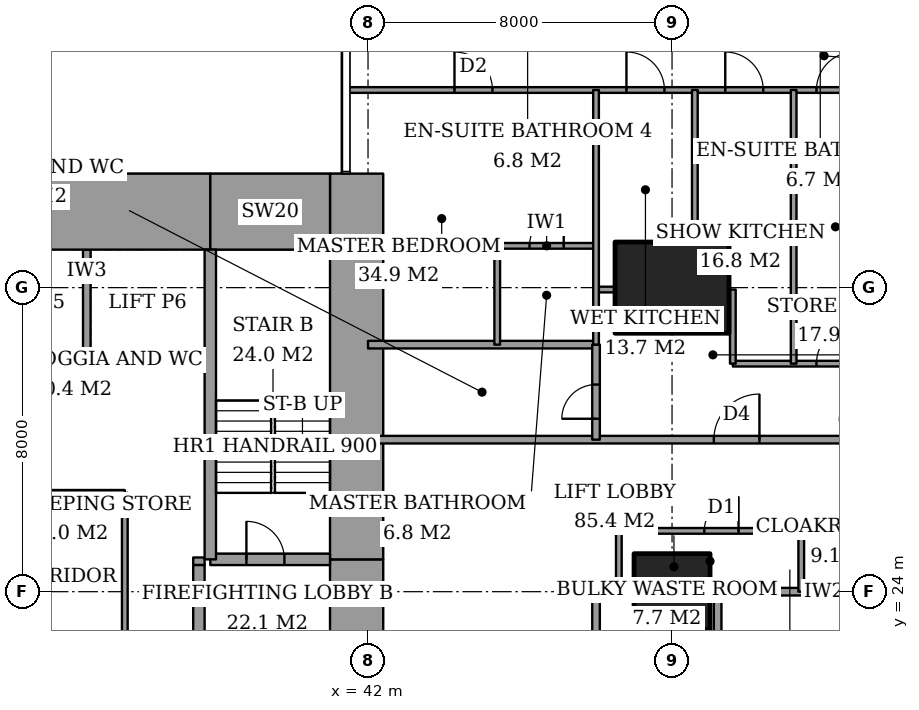
"""IFC4 building model, lengths in metres.
Left out: names, types, materials, properties, quantities, classifications, styles, units other than length and angle.
Written with IfcOpenShell. Run it as: python <this file> out.ifc"""

import sys

from ifc_helpers import new_model, si_unit, direction, frame, frame_2d, origin, origin_2d, place, context, subcontext, project, spatial, rectangle, extrude, element, fill, save


model = new_model("IFC4")
c1 = context("Model", 3, precision=1e-05, world=origin(), true_north=direction((0.0, 1.0)))
c2 = subcontext(c1, "Body", "Model", "MODEL_VIEW")
j1 = project(units=[si_unit("LENGTHUNIT", "METRE"), si_unit("PLANEANGLEUNIT", "RADIAN")], contexts=[c1])
p1 = place(None, origin())
s1 = spatial("IfcSite", under=j1, at=p1, CompositionType="ELEMENT")
p2 = place(p1, origin())
s2 = spatial("IfcBuilding", under=s1, at=p2, CompositionType="ELEMENT")
p3 = place(p2, frame((0.0, 0.0, 62.0)))
s3 = spatial("IfcBuildingStorey", under=s2, at=p3, CompositionType="ELEMENT", Elevation=62.0)
p4 = place(p3, frame((50.0, 24.0, 0.0), z_axis=(0.0, 0.0, 1.0), x_axis=(1.0, 0.0, 0.0)))
e1 = element("IfcColumn", 1, at=p4, inside=s3, PredefinedType="COLUMN", context=c2, shape_type="SweptSolid", body=[
    extrude(rectangle(XDim=2.0, YDim=2.0, at=origin_2d()), origin(), (0.0, 0.0, 1.0), 3.6),
])
p5 = place(p3, frame((50.0, 32.0, 0.0), z_axis=(0.0, 0.0, 1.0), x_axis=(1.0, 0.0, 0.0)))
e2 = element("IfcColumn", 2, at=p5, inside=s3, PredefinedType="COLUMN", context=c2, shape_type="SweptSolid", body=[
    extrude(rectangle(XDim=3.0, YDim=2.4, at=origin_2d()), origin(), (0.0, 0.0, 1.0), 3.6),
])
p6 = place(p3, frame((28.15, 34.0, 0.0), z_axis=(0.0, 0.0, 1.0), x_axis=(1.0, 0.0, 0.0)))
e3 = element("IfcWall", 3, at=p6, inside=s3, PredefinedType="SHEAR", context=c2, shape_type="SweptSolid", body=[
    extrude(rectangle(XDim=9.7, YDim=2.0, at=frame_2d((4.85, 0.0))), origin(), (0.0, 0.0, 1.0), 3.6),
])
p7 = place(p3, frame((37.85, 34.0, 0.0), z_axis=(0.0, 0.0, 1.0), x_axis=(1.0, 0.0, 0.0)))
e4 = element("IfcWall", 4, at=p7, inside=s3, PredefinedType="SHEAR", context=c2, shape_type="SweptSolid", body=[
    extrude(rectangle(XDim=3.15, YDim=2.0, at=frame_2d((1.575, 0.0))), origin(), (0.0, 0.0, 1.0), 3.6),
])
p8 = place(p3, frame((41.7, 13.0, 0.0), z_axis=(0.0, 0.0, 1.0), x_axis=(0.0, 1.0, 0.0)))
e5 = element("IfcWall", 5, at=p8, inside=s3, PredefinedType="SHEAR", context=c2, shape_type="SweptSolid", body=[
    extrude(rectangle(XDim=11.85, YDim=1.4, at=frame_2d((5.925, 0.0))), origin(), (0.0, 0.0, 1.0), 3.6),
])
p9 = place(p8, frame((7.5, 0.0, 0.0)))
e6 = element("IfcOpeningElement", 6, at=p9, cuts=e5, PredefinedType="OPENING", context=c2, shape_type="SweptSolid", body=[
    extrude(rectangle(XDim=1.8, YDim=2.4, at=frame_2d((0.9, 1.2))), frame((0.0, 0.71, 0.0), z_axis=(0.0, -1.0, 0.0), x_axis=(1.0, 0.0, 0.0)), (0.0, 0.0, 1.0), 1.42),
])
p10 = place(p3, frame((41.7, 24.85, 0.0), z_axis=(0.0, 0.0, 1.0), x_axis=(0.0, 1.0, 0.0)))
e7 = element("IfcWall", 7, at=p10, inside=s3, PredefinedType="SHEAR", context=c2, shape_type="SweptSolid", body=[
    extrude(rectangle(XDim=10.15, YDim=1.4, at=frame_2d((5.075, 0.0))), origin(), (0.0, 0.0, 1.0), 3.6),
])
p11 = place(p3, frame((37.85, 24.85, 0.0), z_axis=(0.0, 0.0, 1.0), x_axis=(0.0, 1.0, 0.0)))
e8 = element("IfcWall", 8, at=p11, inside=s3, PredefinedType="SHEAR", context=c2, shape_type="SweptSolid", body=[
    extrude(rectangle(XDim=8.15, YDim=0.3, at=frame_2d((4.075, 0.0))), origin(), (0.0, 0.0, 1.0), 3.6),
])
p12 = place(p3, frame((37.85, 24.85, 0.0), z_axis=(0.0, 0.0, 1.0), x_axis=(1.0, 0.0, 0.0)))
e9 = element("IfcWall", 9, at=p12, inside=s3, PredefinedType="SHEAR", context=c2, shape_type="SweptSolid", body=[
    extrude(rectangle(XDim=3.15, YDim=0.3, at=frame_2d((1.575, 0.0))), origin(), (0.0, 0.0, 1.0), 3.6),
])
p13 = place(p12, frame((0.95, 0.0, 0.0)))
e10 = element("IfcOpeningElement", 10, at=p13, cuts=e9, PredefinedType="OPENING", context=c2, shape_type="SweptSolid", body=[
    extrude(rectangle(XDim=1.0, YDim=2.1, at=frame_2d((0.5, 1.05))), frame((0.0, 0.16, 0.0), z_axis=(0.0, -1.0, 0.0), x_axis=(1.0, 0.0, 0.0)), (0.0, 0.0, 1.0), 0.32),
])
p14 = place(p3, frame((37.55, 18.0, 0.0), z_axis=(0.0, 0.0, 1.0), x_axis=(0.0, 1.0, 0.0)))
e11 = element("IfcWall", 11, at=p14, inside=s3, PredefinedType="PARTITIONING", context=c2, shape_type="SweptSolid", body=[
    extrude(rectangle(XDim=6.7, YDim=0.3, at=frame_2d((3.35, 0.0))), origin(), (0.0, 0.0, 1.0), 3.6),
])
p15 = place(p14, frame((2.8, 0.0, 0.0)))
e12 = element("IfcOpeningElement", 12, at=p15, cuts=e11, PredefinedType="OPENING", context=c2, shape_type="SweptSolid", body=[
    extrude(rectangle(XDim=1.2, YDim=2.1, at=frame_2d((0.6, 1.05))), frame((0.0, 0.16, 0.0), z_axis=(0.0, -1.0, 0.0), x_axis=(1.0, 0.0, 0.0)), (0.0, 0.0, 1.0), 0.32),
])
p16 = place(p3, frame((48.0, 24.0, 0.0), z_axis=(0.0, 0.0, 1.0), x_axis=(1.0, 0.0, 0.0)))
e13 = element("IfcWall", 13, at=p16, inside=s3, PredefinedType="PARTITIONING", context=c2, shape_type="SweptSolid", body=[
    extrude(rectangle(XDim=1.0, YDim=0.2, at=frame_2d((0.5, 0.0))), origin(), (0.0, 0.0, 1.0), 3.35),
])
p17 = place(p3, frame((51.0, 24.0, 0.0), z_axis=(0.0, 0.0, 1.0), x_axis=(1.0, 0.0, 0.0)))
e14 = element("IfcWall", 14, at=p17, inside=s3, PredefinedType="PARTITIONING", context=c2, shape_type="SweptSolid", body=[
    extrude(rectangle(XDim=6.0, YDim=0.2, at=frame_2d((3.0, 0.0))), origin(), (0.0, 0.0, 1.0), 3.35),
])
p18 = place(p3, frame((48.6, 25.6, 0.0), z_axis=(0.0, 0.0, 1.0), x_axis=(1.0, 0.0, 0.0)))
e15 = element("IfcWall", 15, at=p18, inside=s3, PredefinedType="PARTITIONING", context=c2, shape_type="SweptSolid", body=[
    extrude(rectangle(XDim=4.8, YDim=0.15, at=frame_2d((2.4, 0.0))), origin(), (0.0, 0.0, 1.0), 3.35),
])
p19 = place(p18, frame((2.25, 0.0, 0.0)))
e16 = element("IfcOpeningElement", 16, at=p19, cuts=e15, PredefinedType="OPENING", context=c2, shape_type="SweptSolid", body=[
    extrude(rectangle(XDim=0.9, YDim=2.1, at=frame_2d((0.45, 1.05))), frame((0.0, 0.085, 0.0), z_axis=(0.0, -1.0, 0.0), x_axis=(1.0, 0.0, 0.0)), (0.0, 0.0, 1.0), 0.17),
])
p20 = place(p3, frame((42.0, 28.0, 0.0), z_axis=(0.0, 0.0, 1.0), x_axis=(1.0, 0.0, 0.0)))
e17 = element("IfcWall", 17, at=p20, inside=s3, PredefinedType="PARTITIONING", context=c2, shape_type="SweptSolid", body=[
    extrude(rectangle(XDim=17.275, YDim=0.2, at=frame_2d((8.637, 0.0))), origin(), (0.0, 0.0, 1.0), 3.35),
])
p21 = place(p20, frame((9.1, 0.0, 0.0)))
e18 = element("IfcOpeningElement", 18, at=p21, cuts=e17, PredefinedType="OPENING", context=c2, shape_type="SweptSolid", body=[
    extrude(rectangle(XDim=1.2, YDim=2.4, at=frame_2d((0.6, 1.2))), frame((0.0, 0.11, 0.0), z_axis=(0.0, -1.0, 0.0), x_axis=(1.0, 0.0, 0.0)), (0.0, 0.0, 1.0), 0.22),
])
p22 = place(p3, frame((51.6, 30.0, 0.0), z_axis=(0.0, 0.0, 1.0), x_axis=(1.0, 0.0, 0.0)))
e19 = element("IfcWall", 19, at=p22, inside=s3, PredefinedType="PARTITIONING", context=c2, shape_type="SweptSolid", body=[
    extrude(rectangle(XDim=3.8, YDim=0.15, at=frame_2d((1.9, 0.0))), origin(), (0.0, 0.0, 1.0), 3.35),
])
p23 = place(p22, frame((2.2, 0.0, 0.0)))
e20 = element("IfcOpeningElement", 20, at=p23, cuts=e19, PredefinedType="OPENING", context=c2, shape_type="SweptSolid", body=[
    extrude(rectangle(XDim=1.0, YDim=2.1, at=frame_2d((0.5, 1.05))), frame((0.0, 0.085, 0.0), z_axis=(0.0, -1.0, 0.0), x_axis=(1.0, 0.0, 0.0)), (0.0, 0.0, 1.0), 0.17),
])
p24 = place(p3, frame((42.0, 30.5, 0.0), z_axis=(0.0, 0.0, 1.0), x_axis=(1.0, 0.0, 0.0)))
e21 = element("IfcWall", 21, at=p24, inside=s3, PredefinedType="PARTITIONING", context=c2, shape_type="SweptSolid", body=[
    extrude(rectangle(XDim=6.0, YDim=0.2, at=frame_2d((3.0, 0.0))), origin(), (0.0, 0.0, 1.0), 3.35),
])
p25 = place(p3, frame((48.0, 31.95, 0.0), z_axis=(0.0, 0.0, 1.0), x_axis=(1.0, 0.0, 0.0)))
e22 = element("IfcWall", 22, at=p25, inside=s3, PredefinedType="PARTITIONING", context=c2, shape_type="SweptSolid", body=[
    extrude(rectangle(XDim=0.5, YDim=0.15, at=frame_2d((0.25, 0.0))), origin(), (0.0, 0.0, 1.0), 2.634),
])
p26 = place(p3, frame((45.4, 33.1, 0.0), z_axis=(0.0, 0.0, 1.0), x_axis=(1.0, 0.0, 0.0)))
e23 = element("IfcWall", 23, at=p26, inside=s3, PredefinedType="PARTITIONING", context=c2, shape_type="SweptSolid", body=[
    extrude(rectangle(XDim=2.6, YDim=0.15, at=frame_2d((1.3, 0.0))), origin(), (0.0, 0.0, 1.0), 3.35),
])
p27 = place(p26, frame((0.85, 0.0, 0.0)))
e24 = element("IfcOpeningElement", 24, at=p27, cuts=e23, PredefinedType="OPENING", context=c2, shape_type="SweptSolid", body=[
    extrude(rectangle(XDim=0.9, YDim=2.1, at=frame_2d((0.45, 1.05))), frame((0.0, 0.085, 0.0), z_axis=(0.0, -1.0, 0.0), x_axis=(1.0, 0.0, 0.0)), (0.0, 0.0, 1.0), 0.17),
])
p28 = place(p3, frame((41.439, 37.2, 0.0), z_axis=(0.0, 0.0, 1.0), x_axis=(1.0, 0.0, 0.0)))
e25 = element("IfcWall", 25, at=p28, inside=s3, PredefinedType="PARTITIONING", context=c2, shape_type="SweptSolid", body=[
    extrude(rectangle(XDim=25.011, YDim=0.15, at=frame_2d((12.505, 0.0))), origin(), (0.0, 0.0, 1.0), 3.35),
])
p29 = place(p28, frame((12.361, 0.0, 0.0)))
e26 = element("IfcOpeningElement", 26, at=p29, cuts=e25, PredefinedType="OPENING", context=c2, shape_type="SweptSolid", body=[
    extrude(rectangle(XDim=1.0, YDim=2.1, at=frame_2d((0.5, 1.05))), frame((0.0, 0.085, 0.0), z_axis=(0.0, -1.0, 0.0), x_axis=(1.0, 0.0, 0.0)), (0.0, 0.0, 1.0), 0.17),
])
p30 = place(p28, frame((20.924, 0.0, 0.0)))
e27 = element("IfcOpeningElement", 27, at=p30, cuts=e25, PredefinedType="OPENING", context=c2, shape_type="SweptSolid", body=[
    extrude(rectangle(XDim=1.0, YDim=2.1, at=frame_2d((0.5, 1.05))), frame((0.0, 0.085, 0.0), z_axis=(0.0, -1.0, 0.0), x_axis=(1.0, 0.0, 0.0)), (0.0, 0.0, 1.0), 0.17),
])
p31 = place(p28, frame((15.448, 0.0, 0.0)))
e28 = element("IfcOpeningElement", 28, at=p31, cuts=e25, PredefinedType="OPENING", context=c2, shape_type="SweptSolid", body=[
    extrude(rectangle(XDim=0.9, YDim=2.1, at=frame_2d((0.45, 1.05))), frame((0.0, 0.085, 0.0), z_axis=(0.0, -1.0, 0.0), x_axis=(1.0, 0.0, 0.0)), (0.0, 0.0, 1.0), 0.17),
])
p32 = place(p28, frame((9.961, 0.0, 0.0)))
e29 = element("IfcOpeningElement", 29, at=p32, cuts=e25, PredefinedType="OPENING", context=c2, shape_type="SweptSolid", body=[
    extrude(rectangle(XDim=1.0, YDim=2.1, at=frame_2d((0.5, 1.05))), frame((0.0, 0.085, 0.0), z_axis=(0.0, -1.0, 0.0), x_axis=(1.0, 0.0, 0.0)), (0.0, 0.0, 1.0), 0.17),
])
p33 = place(p28, frame((7.361, 0.0, 0.0)))
e30 = element("IfcOpeningElement", 30, at=p33, cuts=e25, PredefinedType="OPENING", context=c2, shape_type="SweptSolid", body=[
    extrude(rectangle(XDim=1.0, YDim=2.1, at=frame_2d((0.5, 1.05))), frame((0.0, 0.085, 0.0), z_axis=(0.0, -1.0, 0.0), x_axis=(1.0, 0.0, 0.0)), (0.0, 0.0, 1.0), 0.17),
])
p34 = place(p28, frame((2.836, 0.0, 0.0)))
e31 = element("IfcOpeningElement", 31, at=p34, cuts=e25, PredefinedType="OPENING", context=c2, shape_type="SweptSolid", body=[
    extrude(rectangle(XDim=1.0, YDim=2.1, at=frame_2d((0.5, 1.05))), frame((0.0, 0.085, 0.0), z_axis=(0.0, -1.0, 0.0), x_axis=(1.0, 0.0, 0.0)), (0.0, 0.0, 1.0), 0.17),
])
p35 = place(p3, frame((45.4, 30.5, 0.0), z_axis=(0.0, 0.0, 1.0), x_axis=(0.0, 1.0, 0.0)))
e32 = element("IfcWall", 32, at=p35, inside=s3, PredefinedType="PARTITIONING", context=c2, shape_type="SweptSolid", body=[
    extrude(rectangle(XDim=2.6, YDim=0.15, at=frame_2d((1.3, 0.0))), origin(), (0.0, 0.0, 1.0), 3.35),
])
p36 = place(p3, frame((48.0, 17.0, 0.0), z_axis=(0.0, 0.0, 1.0), x_axis=(0.0, 1.0, 0.0)))
e33 = element("IfcWall", 33, at=p36, inside=s3, PredefinedType="PARTITIONING", context=c2, shape_type="SweptSolid", body=[
    extrude(rectangle(XDim=7.0, YDim=0.2, at=frame_2d((3.5, 0.0))), origin(), (0.0, 0.0, 1.0), 3.35),
])
p37 = place(p36, frame((4.4, 0.0, 0.0)))
e34 = element("IfcOpeningElement", 34, at=p37, cuts=e33, PredefinedType="OPENING", context=c2, shape_type="SweptSolid", body=[
    extrude(rectangle(XDim=1.2, YDim=2.4, at=frame_2d((0.6, 1.2))), frame((0.0, 0.11, 0.0), z_axis=(0.0, -1.0, 0.0), x_axis=(1.0, 0.0, 0.0)), (0.0, 0.0, 1.0), 0.22),
])
p38 = place(p36, frame((1.0, 0.0, 0.0)))
e35 = element("IfcOpeningElement", 35, at=p38, cuts=e33, PredefinedType="OPENING", context=c2, shape_type="SweptSolid", body=[
    extrude(rectangle(XDim=1.0, YDim=2.1, at=frame_2d((0.5, 1.05))), frame((0.0, 0.11, 0.0), z_axis=(0.0, -1.0, 0.0), x_axis=(1.0, 0.0, 0.0)), (0.0, 0.0, 1.0), 0.22),
])
p39 = place(p3, frame((48.0, 28.0, 0.0), z_axis=(0.0, 0.0, 1.0), x_axis=(0.0, 1.0, 0.0)))
e36 = element("IfcWall", 36, at=p39, inside=s3, PredefinedType="PARTITIONING", context=c2, shape_type="SweptSolid", body=[
    extrude(rectangle(XDim=2.5, YDim=0.2, at=frame_2d((1.25, 0.0))), origin(), (0.0, 0.0, 1.0), 3.35),
])
p40 = place(p39, frame((0.55, 0.0, 0.0)))
e37 = element("IfcOpeningElement", 37, at=p40, cuts=e36, PredefinedType="OPENING", context=c2, shape_type="SweptSolid", body=[
    extrude(rectangle(XDim=0.9, YDim=2.1, at=frame_2d((0.45, 1.05))), frame((0.0, 0.11, 0.0), z_axis=(0.0, -1.0, 0.0), x_axis=(1.0, 0.0, 0.0)), (0.0, 0.0, 1.0), 0.22),
])
p41 = place(p3, frame((48.0, 30.5, 0.0), z_axis=(0.0, 0.0, 1.0), x_axis=(0.0, 1.0, 0.0)))
e38 = element("IfcWall", 38, at=p41, inside=s3, PredefinedType="PARTITIONING", context=c2, shape_type="SweptSolid", body=[
    extrude(rectangle(XDim=6.7, YDim=0.15, at=frame_2d((3.35, 0.0))), origin(), (0.0, 0.0, 1.0), 3.35),
])
p42 = place(p3, frame((48.6, 24.0, 0.0), z_axis=(0.0, 0.0, 1.0), x_axis=(0.0, 1.0, 0.0)))
e39 = element("IfcWall", 39, at=p42, inside=s3, PredefinedType="PARTITIONING", context=c2, shape_type="SweptSolid", body=[
    extrude(rectangle(XDim=1.6, YDim=0.15, at=frame_2d((0.8, 0.0))), origin(), (0.0, 0.0, 1.0), 3.35),
])
p43 = place(p3, frame((50.6, 33.2, 0.0), z_axis=(0.0, 0.0, 1.0), x_axis=(0.0, 1.0, 0.0)))
e40 = element("IfcWall", 40, at=p43, inside=s3, PredefinedType="PARTITIONING", context=c2, shape_type="SweptSolid", body=[
    extrude(rectangle(XDim=4.0, YDim=0.15, at=frame_2d((2.0, 0.0))), origin(), (0.0, 0.0, 1.0), 3.35),
])
p44 = place(p3, frame((51.2, 21.6, 0.0), z_axis=(0.0, 0.0, 1.0), x_axis=(0.0, 1.0, 0.0)))
e41 = element("IfcWall", 41, at=p44, inside=s3, PredefinedType="PARTITIONING", context=c2, shape_type="SweptSolid", body=[
    extrude(rectangle(XDim=2.4, YDim=0.2, at=frame_2d((1.2, 0.0))), origin(), (0.0, 0.0, 1.0), 3.35),
])
p45 = place(p3, frame((51.6, 30.0, 0.0), z_axis=(0.0, 0.0, 1.0), x_axis=(0.0, 1.0, 0.0)))
e42 = element("IfcWall", 42, at=p45, inside=s3, PredefinedType="PARTITIONING", context=c2, shape_type="SweptSolid", body=[
    extrude(rectangle(XDim=1.95, YDim=0.15, at=frame_2d((0.975, 0.0))), origin(), (0.0, 0.0, 1.0), 3.35),
])
p46 = place(p3, frame((53.2, 30.0, 0.0), z_axis=(0.0, 0.0, 1.0), x_axis=(0.0, 1.0, 0.0)))
e43 = element("IfcWall", 43, at=p46, inside=s3, PredefinedType="PARTITIONING", context=c2, shape_type="SweptSolid", body=[
    extrude(rectangle(XDim=7.2, YDim=0.15, at=frame_2d((3.6, 0.0))), origin(), (0.0, 0.0, 1.0), 3.35),
])
p47 = place(p3, frame((53.4, 24.0, 0.0), z_axis=(0.0, 0.0, 1.0), x_axis=(0.0, 1.0, 0.0)))
e44 = element("IfcWall", 44, at=p47, inside=s3, PredefinedType="PARTITIONING", context=c2, shape_type="SweptSolid", body=[
    extrude(rectangle(XDim=1.6, YDim=0.15, at=frame_2d((0.8, 0.0))), origin(), (0.0, 0.0, 1.0), 3.35),
])
p48 = place(p3, frame((25.0, 30.1, 0.0), z_axis=(0.0, 0.0, 1.0), x_axis=(1.0, 0.0, 0.0)))
e45 = element("IfcWall", 45, at=p48, inside=s3, PredefinedType="PARTITIONING", context=c2, shape_type="SweptSolid", body=[
    extrude(rectangle(XDim=12.7, YDim=0.2, at=frame_2d((6.35, 0.0))), origin(), (0.0, 0.0, 1.0), 3.6),
])
p49 = place(p48, frame((0.9, 0.0, 0.0)))
e46 = element("IfcOpeningElement", 46, at=p49, cuts=e45, PredefinedType="OPENING", context=c2, shape_type="SweptSolid", body=[
    extrude(rectangle(XDim=1.2, YDim=2.1, at=frame_2d((0.6, 1.05))), frame((0.0, 0.11, 0.0), z_axis=(0.0, -1.0, 0.0), x_axis=(1.0, 0.0, 0.0)), (0.0, 0.0, 1.0), 0.22),
])
p50 = place(p3, frame((34.6, 30.2, 0.0), z_axis=(0.0, 0.0, 1.0), x_axis=(0.0, 1.0, 0.0)))
e47 = element("IfcWall", 47, at=p50, inside=s3, PredefinedType="PARTITIONING", context=c2, shape_type="SweptSolid", body=[
    extrude(rectangle(XDim=2.8, YDim=0.2, at=frame_2d((1.4, 0.0))), origin(), (0.0, 0.0, 1.0), 3.6),
])
p51 = place(p3, frame((37.4, 24.8, 0.0), z_axis=(0.0, 0.0, 1.0), x_axis=(1.0, 0.0, 0.0)))
e48 = element("IfcWall", 48, at=p51, inside=s3, PredefinedType="PARTITIONING", context=c2, shape_type="SweptSolid", body=[
    extrude(rectangle(XDim=0.3, YDim=0.2, at=frame_2d((0.15, 0.0))), origin(), (0.0, 0.0, 1.0), 3.6),
])
for number, where, z_axis, x_axis in (
    (49, (30.4, 26.6, 0.0), (0.0, 0.0, 1.0), (1.0, 0.0, 0.0)),
    (50, (35.6, 21.4, 0.0), (0.0, 0.0, 1.0), (0.0, 1.0, 0.0)),
):
    element("IfcWall", number, at=place(p3, frame(where, z_axis=z_axis, x_axis=x_axis)), inside=s3, PredefinedType="PARTITIONING", context=c2, shape_type="SweptSolid", body=[
        extrude(rectangle(XDim=5.2, YDim=0.15, at=frame_2d((2.6, 0.0))), origin(), (0.0, 0.0, 1.0), 3.35),
    ])
p52 = place(p29, origin())
e51 = element("IfcDoor", 51, at=p52, inside=s3, OperationType="SINGLE_SWING_LEFT", PredefinedType="DOOR", context=c2, shape_type="SweptSolid", body=[
    extrude(rectangle(XDim=1.0, YDim=2.1, at=frame_2d((0.5, 1.05))), frame((0.0, 0.025, 0.0), z_axis=(0.0, -1.0, 0.0), x_axis=(1.0, 0.0, 0.0)), (0.0, 0.0, 1.0), 0.05),
])
fill(e26, e51)
p53 = place(p21, origin())
e52 = element("IfcDoor", 52, at=p53, inside=s3, OperationType="SINGLE_SWING_LEFT", PredefinedType="DOOR", context=c2, shape_type="SweptSolid", body=[
    extrude(rectangle(XDim=1.2, YDim=2.4, at=frame_2d((0.6, 1.2))), frame((0.0, 0.025, 0.0), z_axis=(0.0, -1.0, 0.0), x_axis=(1.0, 0.0, 0.0)), (0.0, 0.0, 1.0), 0.05),
])
fill(e18, e52)
p54 = place(p23, origin())
e53 = element("IfcDoor", 53, at=p54, inside=s3, OperationType="SINGLE_SWING_LEFT", PredefinedType="DOOR", context=c2, shape_type="SweptSolid", body=[
    extrude(rectangle(XDim=1.0, YDim=2.1, at=frame_2d((0.5, 1.05))), frame((0.0, 0.025, 0.0), z_axis=(0.0, -1.0, 0.0), x_axis=(1.0, 0.0, 0.0)), (0.0, 0.0, 1.0), 0.05),
])
fill(e20, e53)
p55 = place(p32, origin())
e54 = element("IfcDoor", 54, at=p55, inside=s3, OperationType="SINGLE_SWING_RIGHT", PredefinedType="DOOR", context=c2, shape_type="SweptSolid", body=[
    extrude(rectangle(XDim=1.0, YDim=2.1, at=frame_2d((0.5, 1.05))), frame((0.0, 0.025, 0.0), z_axis=(0.0, -1.0, 0.0), x_axis=(1.0, 0.0, 0.0)), (0.0, 0.0, 1.0), 0.05),
])
fill(e29, e54)
p56 = place(p33, origin())
e55 = element("IfcDoor", 55, at=p56, inside=s3, OperationType="SINGLE_SWING_RIGHT", PredefinedType="DOOR", context=c2, shape_type="SweptSolid", body=[
    extrude(rectangle(XDim=1.0, YDim=2.1, at=frame_2d((0.5, 1.05))), frame((0.0, 0.025, 0.0), z_axis=(0.0, -1.0, 0.0), x_axis=(1.0, 0.0, 0.0)), (0.0, 0.0, 1.0), 0.05),
])
fill(e30, e55)
p57 = place(p27, origin())
e56 = element("IfcDoor", 56, at=p57, inside=s3, OperationType="SINGLE_SWING_LEFT", PredefinedType="DOOR", context=c2, shape_type="SweptSolid", body=[
    extrude(rectangle(XDim=0.9, YDim=2.1, at=frame_2d((0.45, 1.05))), frame((0.0, 0.025, 0.0), z_axis=(0.0, -1.0, 0.0), x_axis=(1.0, 0.0, 0.0)), (0.0, 0.0, 1.0), 0.05),
])
fill(e24, e56)
p58 = place(p34, origin())
e57 = element("IfcDoor", 57, at=p58, inside=s3, OperationType="SINGLE_SWING_RIGHT", PredefinedType="DOOR", context=c2, shape_type="SweptSolid", body=[
    extrude(rectangle(XDim=1.0, YDim=2.1, at=frame_2d((0.5, 1.05))), frame((0.0, 0.025, 0.0), z_axis=(0.0, -1.0, 0.0), x_axis=(1.0, 0.0, 0.0)), (0.0, 0.0, 1.0), 0.05),
])
fill(e31, e57)
p59 = place(p40, origin())
e58 = element("IfcDoor", 58, at=p59, inside=s3, OperationType="SINGLE_SWING_RIGHT", PredefinedType="DOOR", context=c2, shape_type="SweptSolid", body=[
    extrude(rectangle(XDim=0.9, YDim=2.1, at=frame_2d((0.45, 1.05))), frame((0.0, 0.025, 0.0), z_axis=(0.0, -1.0, 0.0), x_axis=(1.0, 0.0, 0.0)), (0.0, 0.0, 1.0), 0.05),
])
fill(e37, e58)
p60 = place(p19, origin())
e59 = element("IfcDoor", 59, at=p60, inside=s3, OperationType="SINGLE_SWING_LEFT", PredefinedType="DOOR", context=c2, shape_type="SweptSolid", body=[
    extrude(rectangle(XDim=0.9, YDim=2.1, at=frame_2d((0.45, 1.05))), frame((0.0, 0.025, 0.0), z_axis=(0.0, -1.0, 0.0), x_axis=(1.0, 0.0, 0.0)), (0.0, 0.0, 1.0), 0.05),
])
fill(e16, e59)
p61 = place(p13, origin())
e60 = element("IfcDoor", 60, at=p61, inside=s3, OperationType="SINGLE_SWING_RIGHT", PredefinedType="DOOR", context=c2, shape_type="SweptSolid", body=[
    extrude(rectangle(XDim=1.0, YDim=2.1, at=frame_2d((0.5, 1.05))), frame((0.0, 0.025, 0.0), z_axis=(0.0, -1.0, 0.0), x_axis=(1.0, 0.0, 0.0)), (0.0, 0.0, 1.0), 0.05),
])
fill(e10, e60)
save(model, sys.argv[1])
